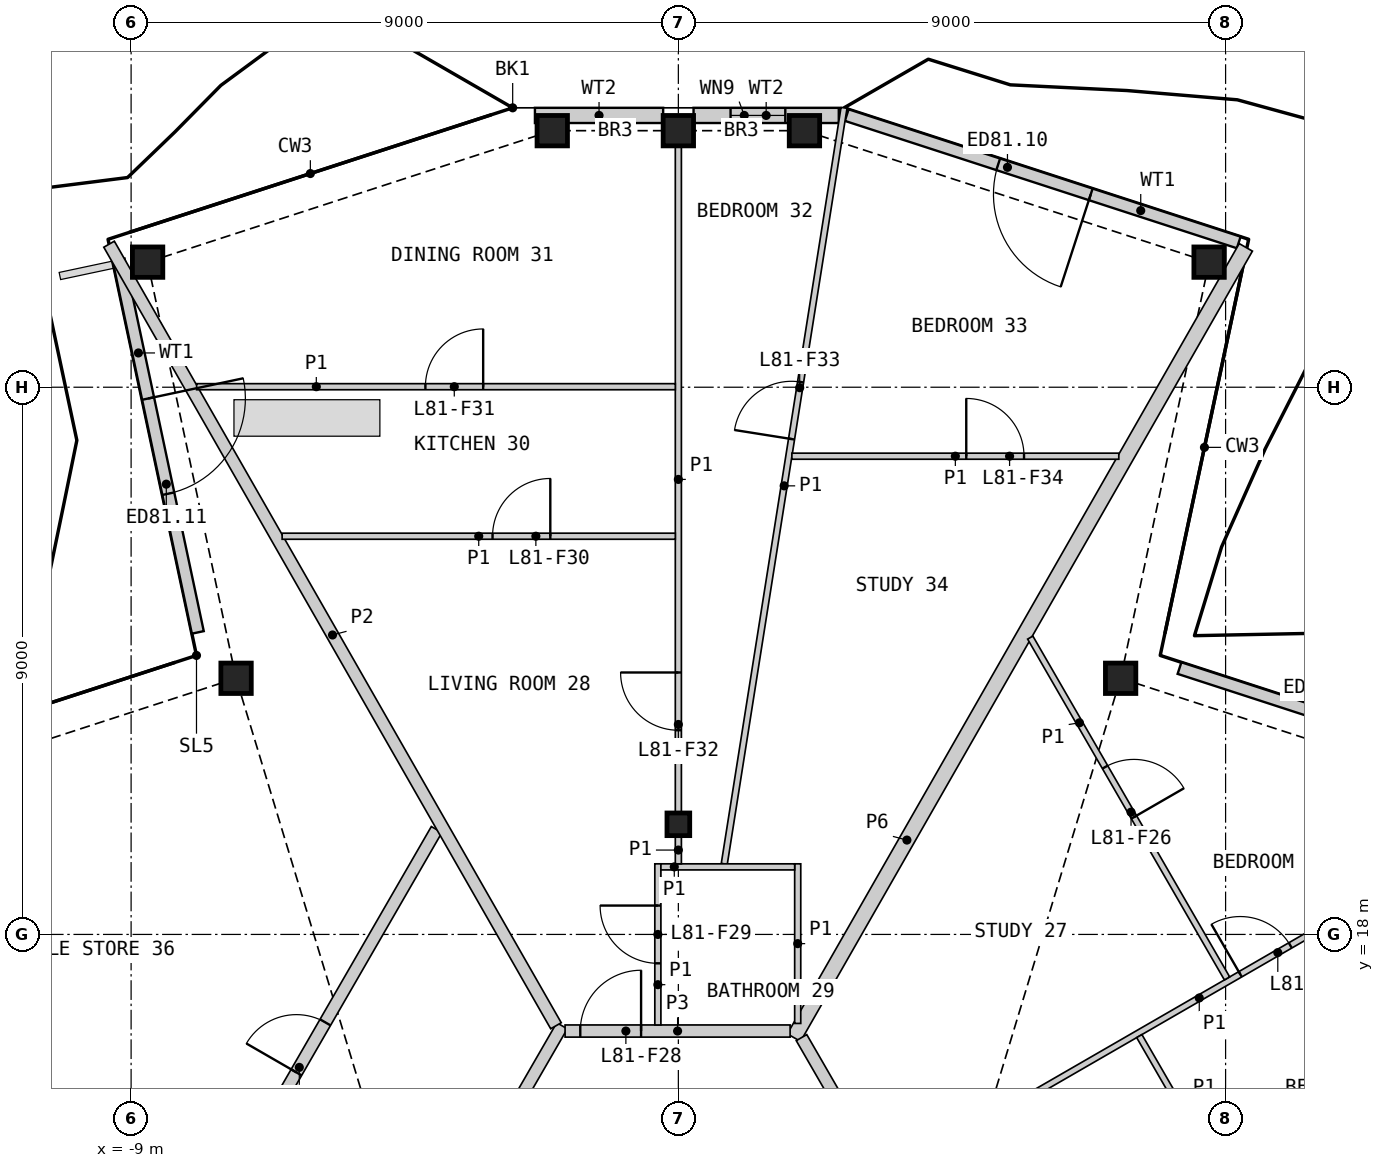
"""IFC4 building model, lengths in metres.
Left out: names, types, materials, properties, quantities, classifications, styles, units other than length and angle.
Written with IfcOpenShell. Run it as: python <this file> out.ifc"""

import sys

from ifc_helpers import new_model, si_unit, direction, frame, frame_2d, origin, origin_2d, place, context, subcontext, project, spatial, rectangle, hollow_rectangle, i_section, extrude, element, fill, save


model = new_model("IFC4")
c1 = context("Model", 3, precision=1e-05, world=origin(), true_north=direction((0.0, 1.0)))
c2 = subcontext(c1, "Body", "Model", "MODEL_VIEW")
j1 = project(units=[si_unit("LENGTHUNIT", "METRE"), si_unit("PLANEANGLEUNIT", "RADIAN")], contexts=[c1])
p1 = place(None, origin())
s1 = spatial("IfcSite", under=j1, at=p1, CompositionType="ELEMENT")
p2 = place(p1, origin())
s2 = spatial("IfcBuilding", under=s1, at=p2, CompositionType="ELEMENT")
p3 = place(p2, frame((0.0, 0.0, 364.4)))
s3 = spatial("IfcBuildingStorey", under=s2, at=p3, CompositionType="ELEMENT", Elevation=364.4)
for number, where, z_axis, x_axis in (
    (1, (7.274, 22.213, 0.0), (0.0, 0.0, 1.0), (1.0, 0.0, 0.0)),
    (2, (8.729, 29.057, 0.0), (0.0, 0.0, 1.0), (1.0, 0.0, 0.0)),
    (3, (2.074, 31.219, 0.0), (0.0, 0.0, 1.0), (1.0, 0.0, 0.0)),
    (4, (0.0, 31.219, 0.0), (0.0, 0.0, 1.0), (1.0, 0.0, 0.0)),
    (5, (-2.074, 31.219, 0.0), (0.0, 0.0, 1.0), (1.0, 0.0, 0.0)),
    (6, (-8.729, 29.057, 0.0), (0.0, 0.0, 1.0), (1.0, 0.0, 0.0)),
    (7, (-7.274, 22.213, 0.0), (0.0, 0.0, 1.0), (1.0, 0.0, 0.0)),
):
    element("IfcColumn", number, at=place(p3, frame(where, z_axis=z_axis, x_axis=x_axis)), inside=s3, PredefinedType="COLUMN", context=c2, shape_type="SweptSolid", body=[
        extrude(hollow_rectangle(XDim=0.5, YDim=0.5, WallThickness=0.03, at=origin_2d()), origin(), (0.0, 0.0, 1.0), 3.4),
    ])
p4 = place(p3, frame((0.0, 19.811, 0.0), z_axis=(0.0, 0.0, 1.0), x_axis=(1.0, 0.0, 0.0)))
e8 = element("IfcColumn", 8, at=p4, inside=s3, PredefinedType="COLUMN", context=c2, shape_type="SweptSolid", body=[
    extrude(i_section(OverallWidth=0.374, OverallDepth=0.372, WebThickness=0.016, FlangeThickness=0.026, at=origin_2d()), origin(), (0.0, 0.0, 1.0), 3.4),
])
p5 = place(p3, frame((14.331, 20.402, 0.0), z_axis=(0.0, 0.0, 1.0), x_axis=(-0.951058447414, 0.30901105094, 0.0)))
e9 = element("IfcWall", 9, at=p5, inside=s3, PredefinedType="SOLIDWALL", context=c2, shape_type="SweptSolid", body=[
    extrude(rectangle(XDim=6.402, YDim=0.2, at=frame_2d((3.201, 0.0))), origin(), (0.0, 0.0, 1.0), 2.634),
])
p6 = place(p5, frame((2.469, 0.0, 0.0)))
e10 = element("IfcOpeningElement", 10, at=p6, cuts=e9, PredefinedType="OPENING", context=c2, shape_type="SweptSolid", body=[
    extrude(rectangle(XDim=1.6, YDim=2.25, at=frame_2d((0.8, 1.125))), frame((0.0, 0.11, 0.0), z_axis=(0.0, -1.0, 0.0), x_axis=(1.0, 0.0, 0.0)), (0.0, 0.0, 1.0), 0.22),
])
p7 = place(p3, frame((9.216, 29.381, 0.0), z_axis=(0.0, 0.0, 1.0), x_axis=(-0.951058150748, 0.309011964002, 0.0)))
e11 = element("IfcWall", 11, at=p7, inside=s3, PredefinedType="SOLIDWALL", context=c2, shape_type="SweptSolid", body=[
    extrude(rectangle(XDim=6.779, YDim=0.2, at=frame_2d((3.389, 0.0))), origin(), (0.0, 0.0, 1.0), 2.634),
])
p8 = place(p7, frame((2.559, 0.0, 0.0)))
e12 = element("IfcOpeningElement", 12, at=p8, cuts=e11, PredefinedType="OPENING", context=c2, shape_type="SweptSolid", body=[
    extrude(rectangle(XDim=1.6, YDim=2.25, at=frame_2d((0.8, 1.125))), frame((0.0, 0.11, 0.0), z_axis=(0.0, -1.0, 0.0), x_axis=(1.0, 0.0, 0.0)), (0.0, 0.0, 1.0), 0.22),
])
p9 = place(p3, frame((2.638, 31.47, 0.0), z_axis=(0.0, 0.0, 1.0), x_axis=(-1.0, 0.0, 0.0)))
e13 = element("IfcWall", 13, at=p9, inside=s3, PredefinedType="SOLIDWALL", context=c2, shape_type="SweptSolid", body=[
    extrude(rectangle(XDim=2.388, YDim=0.25, at=frame_2d((1.194, 0.0))), origin(), (0.0, 0.0, 1.0), 2.634),
])
p10 = place(p9, frame((0.88, 0.0, 0.6)))
e14 = element("IfcOpeningElement", 14, at=p10, cuts=e13, PredefinedType="OPENING", context=c2, shape_type="SweptSolid", body=[
    extrude(rectangle(XDim=0.9, YDim=1.8, at=frame_2d((0.45, 0.9))), frame((0.0, 0.135, 0.0), z_axis=(0.0, -1.0, 0.0), x_axis=(1.0, 0.0, 0.0)), (0.0, 0.0, 1.0), 0.27),
])
p11 = place(p3, frame((-0.25, 31.47, 0.0), z_axis=(0.0, 0.0, 1.0), x_axis=(-1.0, 0.0, 0.0)))
e15 = element("IfcWall", 15, at=p11, inside=s3, PredefinedType="SOLIDWALL", context=c2, shape_type="SweptSolid", body=[
    extrude(rectangle(XDim=2.109, YDim=0.25, at=frame_2d((1.054, 0.0))), origin(), (0.0, 0.0, 1.0), 2.634),
])
p12 = place(p3, frame((-9.206, 29.096, 0.0), z_axis=(0.0, 0.0, 1.0), x_axis=(0.207889514624, -0.978152314167, 0.0)))
e16 = element("IfcWall", 16, at=p12, inside=s3, PredefinedType="SOLIDWALL", context=c2, shape_type="SweptSolid", body=[
    extrude(rectangle(XDim=6.265, YDim=0.2, at=frame_2d((3.133, 0.0))), origin(), (0.0, 0.0, 1.0), 2.634),
])
p13 = place(p12, frame((2.333, 0.0, 0.0)))
e17 = element("IfcOpeningElement", 17, at=p13, cuts=e16, PredefinedType="OPENING", context=c2, shape_type="SweptSolid", body=[
    extrude(rectangle(XDim=1.6, YDim=2.25, at=frame_2d((0.8, 1.125))), frame((0.0, 0.11, 0.0), z_axis=(0.0, -1.0, 0.0), x_axis=(1.0, 0.0, 0.0)), (0.0, 0.0, 1.0), 0.22),
])
p14 = place(p3, frame((1.901, 16.302, 0.0), z_axis=(0.0, 0.0, 1.0), x_axis=(0.496368960053, 0.86811166073, 0.0)))
e18 = element("IfcWall", 18, at=p14, inside=s3, PredefinedType="PARTITIONING", context=c2, shape_type="SweptSolid", body=[
    extrude(rectangle(XDim=14.972, YDim=0.25, at=frame_2d((7.486, 0.0))), origin(), (0.0, 0.0, 1.0), 2.33),
])
p15 = place(p3, frame((2.025, 16.303, 0.0), z_axis=(0.0, 0.0, 1.0), x_axis=(0.500004215162, -0.866022970146, 0.0)))
e19 = element("IfcWall", 19, at=p15, inside=s3, PredefinedType="PARTITIONING", context=c2, shape_type="SweptSolid", body=[
    extrude(rectangle(XDim=4.3, YDim=0.2, at=frame_2d((2.15, 0.0))), origin(), (0.0, 0.0, 1.0), 3.1),
])
p16 = place(p3, frame((-4.176, 12.579, 0.0), z_axis=(0.0, 0.0, 1.0), x_axis=(0.499974648164, 0.866040040179, 0.0)))
e20 = element("IfcWall", 20, at=p16, inside=s3, PredefinedType="PARTITIONING", context=c2, shape_type="SweptSolid", body=[
    extrude(rectangle(XDim=4.525, YDim=0.2, at=frame_2d((2.263, 0.0))), origin(), (0.0, 0.0, 1.0), 3.1),
])
p17 = place(p3, frame((-1.863, 16.411, 0.0), z_axis=(0.0, 0.0, 1.0), x_axis=(1.0, 0.0, 0.0)))
e21 = element("IfcWall", 21, at=p17, inside=s3, PredefinedType="PARTITIONING", context=c2, shape_type="SweptSolid", body=[
    extrude(rectangle(XDim=3.701, YDim=0.2, at=frame_2d((1.851, 0.0))), origin(), (0.0, 0.0, 1.0), 3.1),
])
p18 = place(p17, frame((0.25, 0.0, 0.0)))
e22 = element("IfcOpeningElement", 22, at=p18, cuts=e21, PredefinedType="OPENING", context=c2, shape_type="SweptSolid", body=[
    extrude(rectangle(XDim=1.0, YDim=2.1, at=frame_2d((0.5, 1.05))), frame((0.0, 0.11, 0.0), z_axis=(0.0, -1.0, 0.0), x_axis=(1.0, 0.0, 0.0)), (0.0, 0.0, 1.0), 0.22),
])
p19 = place(p3, frame((-11.473, 6.74, 0.0), z_axis=(0.0, 0.0, 1.0), x_axis=(0.499993542657, 0.866029131901, 0.0)))
e23 = element("IfcWall", 23, at=p19, inside=s3, PredefinedType="PARTITIONING", context=c2, shape_type="SweptSolid", body=[
    extrude(rectangle(XDim=14.994, YDim=0.2, at=frame_2d((7.497, 0.0))), origin(), (0.0, 0.0, 1.0), 2.33),
])
p20 = place(p19, frame((10.383, 0.0, 0.0)))
e24 = element("IfcOpeningElement", 24, at=p20, cuts=e23, PredefinedType="OPENING", context=c2, shape_type="SweptSolid", body=[
    extrude(rectangle(XDim=0.95, YDim=2.1, at=frame_2d((0.475, 1.05))), frame((0.0, 0.11, 0.0), z_axis=(0.0, -1.0, 0.0), x_axis=(1.0, 0.0, 0.0)), (0.0, 0.0, 1.0), 0.22),
])
p21 = place(p3, frame((-9.362, 29.352, 0.0), z_axis=(0.0, 0.0, 1.0), x_axis=(0.496351997927, -0.868121359116, 0.0)))
e25 = element("IfcWall", 25, at=p21, inside=s3, PredefinedType="PARTITIONING", context=c2, shape_type="SweptSolid", body=[
    extrude(rectangle(XDim=14.807, YDim=0.2, at=frame_2d((7.404, 0.0))), origin(), (0.0, 0.0, 1.0), 2.33),
])
p22 = place(p3, frame((0.755, 19.16, 0.0), z_axis=(0.0, 0.0, 1.0), x_axis=(0.15643456532, 0.987688324712, 0.0)))
e26 = element("IfcWall", 26, at=p22, inside=s3, PredefinedType="PARTITIONING", context=c2, shape_type="SweptSolid", body=[
    extrude(rectangle(XDim=12.59, YDim=0.1, at=frame_2d((6.295, 0.0))), origin(), (0.0, 0.0, 1.0), 2.33),
])
p23 = place(p22, frame((7.074, 0.0, 0.0)))
e27 = element("IfcOpeningElement", 27, at=p23, cuts=e26, PredefinedType="OPENING", context=c2, shape_type="SweptSolid", body=[
    extrude(rectangle(XDim=0.95, YDim=2.1, at=frame_2d((0.475, 1.05))), frame((0.0, 0.06, 0.0), z_axis=(0.0, -1.0, 0.0), x_axis=(1.0, 0.0, 0.0)), (0.0, 0.0, 1.0), 0.12),
])
p24 = place(p3, frame((3.465, 14.01, 0.0), z_axis=(0.0, 0.0, 1.0), x_axis=(0.866032376801, 0.499987922186, 0.0)))
e28 = element("IfcWall", 28, at=p24, inside=s3, PredefinedType="PARTITIONING", context=c2, shape_type="SweptSolid", body=[
    extrude(rectangle(XDim=11.782, YDim=0.1, at=frame_2d((5.891, 0.0))), origin(), (0.0, 0.0, 1.0), 2.33),
])
p25 = place(p24, frame((6.67, 0.0, 0.0)))
e29 = element("IfcOpeningElement", 29, at=p25, cuts=e28, PredefinedType="OPENING", context=c2, shape_type="SweptSolid", body=[
    extrude(rectangle(XDim=0.95, YDim=2.1, at=frame_2d((0.475, 1.05))), frame((0.0, 0.06, 0.0), z_axis=(0.0, -1.0, 0.0), x_axis=(1.0, 0.0, 0.0)), (0.0, 0.0, 1.0), 0.12),
])
p26 = place(p3, frame((0.0, 20.008, 0.0), z_axis=(0.0, 0.0, 1.0), x_axis=(0.0, 1.0, 0.0)))
e30 = element("IfcWall", 30, at=p26, inside=s3, PredefinedType="PARTITIONING", context=c2, shape_type="SweptSolid", body=[
    extrude(rectangle(XDim=10.951, YDim=0.1, at=frame_2d((5.476, 0.0))), origin(), (0.0, 0.0, 1.0), 2.33),
])
p27 = place(p26, frame((1.35, 0.0, 0.0)))
e31 = element("IfcOpeningElement", 31, at=p27, cuts=e30, PredefinedType="OPENING", context=c2, shape_type="SweptSolid", body=[
    extrude(rectangle(XDim=0.95, YDim=2.1, at=frame_2d((0.475, 1.05))), frame((0.0, 0.06, 0.0), z_axis=(0.0, -1.0, 0.0), x_axis=(1.0, 0.0, 0.0)), (0.0, 0.0, 1.0), 0.12),
])
p28 = place(p3, frame((-7.922, 27.009, 0.0), z_axis=(0.0, 0.0, 1.0), x_axis=(1.0, 0.0, 0.0)))
e32 = element("IfcWall", 32, at=p28, inside=s3, PredefinedType="PARTITIONING", context=c2, shape_type="SweptSolid", body=[
    extrude(rectangle(XDim=7.872, YDim=0.1, at=frame_2d((3.936, 0.0))), origin(), (0.0, 0.0, 1.0), 2.33),
])
p29 = place(p28, frame((3.762, 0.0, 0.0)))
e33 = element("IfcOpeningElement", 33, at=p29, cuts=e32, PredefinedType="OPENING", context=c2, shape_type="SweptSolid", body=[
    extrude(rectangle(XDim=0.95, YDim=2.1, at=frame_2d((0.475, 1.05))), frame((0.0, 0.06, 0.0), z_axis=(0.0, -1.0, 0.0), x_axis=(1.0, 0.0, 0.0)), (0.0, 0.0, 1.0), 0.12),
])
p30 = place(p3, frame((5.787, 22.882, 0.0), z_axis=(0.0, 0.0, 1.0), x_axis=(0.500001069878, -0.866024786089, 0.0)))
e34 = element("IfcWall", 34, at=p30, inside=s3, PredefinedType="PARTITIONING", context=c2, shape_type="SweptSolid", body=[
    extrude(rectangle(XDim=6.473, YDim=0.1, at=frame_2d((3.236, 0.0))), origin(), (0.0, 0.0, 1.0), 2.33),
])
p31 = place(p30, frame((2.46, 0.0, 0.0)))
e35 = element("IfcOpeningElement", 35, at=p31, cuts=e34, PredefinedType="OPENING", context=c2, shape_type="SweptSolid", body=[
    extrude(rectangle(XDim=0.95, YDim=2.1, at=frame_2d((0.475, 1.05))), frame((0.0, 0.06, 0.0), z_axis=(0.0, -1.0, 0.0), x_axis=(1.0, 0.0, 0.0)), (0.0, 0.0, 1.0), 0.12),
])
p32 = place(p3, frame((-6.516, 24.549, 0.0), z_axis=(0.0, 0.0, 1.0), x_axis=(1.0, 0.0, 0.0)))
e36 = element("IfcWall", 36, at=p32, inside=s3, PredefinedType="PARTITIONING", context=c2, shape_type="SweptSolid", body=[
    extrude(rectangle(XDim=6.466, YDim=0.1, at=frame_2d((3.233, 0.0))), origin(), (0.0, 0.0, 1.0), 2.33),
])
p33 = place(p32, frame((3.46, 0.0, 0.0)))
e37 = element("IfcOpeningElement", 37, at=p33, cuts=e36, PredefinedType="OPENING", context=c2, shape_type="SweptSolid", body=[
    extrude(rectangle(XDim=0.95, YDim=2.1, at=frame_2d((0.475, 1.05))), frame((0.0, 0.06, 0.0), z_axis=(0.0, -1.0, 0.0), x_axis=(1.0, 0.0, 0.0)), (0.0, 0.0, 1.0), 0.12),
])
p34 = place(p3, frame((1.867, 25.865, 0.0), z_axis=(0.0, 0.0, 1.0), x_axis=(1.0, 0.0, 0.0)))
e38 = element("IfcWall", 38, at=p34, inside=s3, PredefinedType="PARTITIONING", context=c2, shape_type="SweptSolid", body=[
    extrude(rectangle(XDim=5.376, YDim=0.1, at=frame_2d((2.688, 0.0))), origin(), (0.0, 0.0, 1.0), 2.33),
])
p35 = place(p34, frame((2.868, 0.0, 0.0)))
e39 = element("IfcOpeningElement", 39, at=p35, cuts=e38, PredefinedType="OPENING", context=c2, shape_type="SweptSolid", body=[
    extrude(rectangle(XDim=0.95, YDim=2.1, at=frame_2d((0.475, 1.05))), frame((0.0, 0.06, 0.0), z_axis=(0.0, -1.0, 0.0), x_axis=(1.0, 0.0, 0.0)), (0.0, 0.0, 1.0), 0.12),
])
p36 = place(p3, frame((7.581, 16.328, 0.0), z_axis=(0.0, 0.0, 1.0), x_axis=(0.500005610874, -0.86602216432, 0.0)))
e40 = element("IfcWall", 40, at=p36, inside=s3, PredefinedType="PARTITIONING", context=c2, shape_type="SweptSolid", body=[
    extrude(rectangle(XDim=5.1, YDim=0.1, at=frame_2d((2.55, 0.0))), origin(), (0.0, 0.0, 1.0), 2.33),
])
p37 = place(p36, frame((2.379, 0.0, 0.0)))
e41 = element("IfcOpeningElement", 41, at=p37, cuts=e40, PredefinedType="OPENING", context=c2, shape_type="SweptSolid", body=[
    extrude(rectangle(XDim=0.95, YDim=2.1, at=frame_2d((0.475, 1.05))), frame((0.0, 0.06, 0.0), z_axis=(0.0, -1.0, 0.0), x_axis=(1.0, 0.0, 0.0)), (0.0, 0.0, 1.0), 0.12),
])
p38 = place(p3, frame((-0.337, 16.511, 0.0), z_axis=(0.0, 0.0, 1.0), x_axis=(0.0, 1.0, 0.0)))
e42 = element("IfcWall", 42, at=p38, inside=s3, PredefinedType="PARTITIONING", context=c2, shape_type="SweptSolid", body=[
    extrude(rectangle(XDim=2.65, YDim=0.1, at=frame_2d((1.325, 0.0))), origin(), (0.0, 0.0, 1.0), 2.33),
])
p39 = place(p38, frame((1.014, 0.0, 0.0)))
e43 = element("IfcOpeningElement", 43, at=p39, cuts=e42, PredefinedType="OPENING", context=c2, shape_type="SweptSolid", body=[
    extrude(rectangle(XDim=0.95, YDim=2.1, at=frame_2d((0.475, 1.05))), frame((0.0, 0.06, 0.0), z_axis=(0.0, -1.0, 0.0), x_axis=(1.0, 0.0, 0.0)), (0.0, 0.0, 1.0), 0.12),
])
p40 = place(p3, frame((1.963, 16.536, 0.0), z_axis=(0.0, 0.0, 1.0), x_axis=(0.0, 1.0, 0.0)))
e44 = element("IfcWall", 44, at=p40, inside=s3, PredefinedType="PARTITIONING", context=c2, shape_type="SweptSolid", body=[
    extrude(rectangle(XDim=2.625, YDim=0.1, at=frame_2d((1.312, 0.0))), origin(), (0.0, 0.0, 1.0), 2.33),
])
p41 = place(p3, frame((-0.287, 19.111, 0.0), z_axis=(0.0, 0.0, 1.0), x_axis=(1.0, 0.0, 0.0)))
e45 = element("IfcWall", 45, at=p41, inside=s3, PredefinedType="PARTITIONING", context=c2, shape_type="SweptSolid", body=[
    extrude(rectangle(XDim=2.2, YDim=0.1, at=frame_2d((1.1, 0.0))), origin(), (0.0, 0.0, 1.0), 2.33),
])
p42 = place(p3, frame((0.0, 19.161, 0.0), z_axis=(0.0, 0.0, 1.0), x_axis=(0.0, 1.0, 0.0)))
e46 = element("IfcWall", 46, at=p42, inside=s3, PredefinedType="PARTITIONING", context=c2, shape_type="SweptSolid", body=[
    extrude(rectangle(XDim=0.453, YDim=0.1, at=frame_2d((0.227, 0.0))), origin(), (0.0, 0.0, 1.0), 2.33),
])
p43 = place(p8, origin())
e47 = element("IfcDoor", 47, at=p43, inside=s3, OperationType="DOUBLE_DOOR_SINGLE_SWING", PredefinedType="DOOR", context=c2, shape_type="SweptSolid", body=[
    extrude(rectangle(XDim=1.6, YDim=2.25, at=frame_2d((0.8, 1.125))), frame((0.0, 0.025, 0.0), z_axis=(0.0, -1.0, 0.0), x_axis=(1.0, 0.0, 0.0)), (0.0, 0.0, 1.0), 0.05),
])
fill(e12, e47)
p44 = place(p10, origin())
e48 = element("IfcWindow", 48, at=p44, inside=s3, PartitioningType="SINGLE_PANEL", PredefinedType="WINDOW", context=c2, shape_type="SweptSolid", body=[
    extrude(rectangle(XDim=0.9, YDim=1.8, at=frame_2d((0.45, 0.9))), frame((0.0, 0.03, 0.0), z_axis=(0.0, -1.0, 0.0), x_axis=(1.0, 0.0, 0.0)), (0.0, 0.0, 1.0), 0.06),
])
fill(e14, e48)
p45 = place(p13, origin())
e49 = element("IfcDoor", 49, at=p45, inside=s3, OperationType="DOUBLE_DOOR_SINGLE_SWING", PredefinedType="DOOR", context=c2, shape_type="SweptSolid", body=[
    extrude(rectangle(XDim=1.6, YDim=2.25, at=frame_2d((0.8, 1.125))), frame((0.0, 0.025, 0.0), z_axis=(0.0, -1.0, 0.0), x_axis=(1.0, 0.0, 0.0)), (0.0, 0.0, 1.0), 0.05),
])
fill(e17, e49)
p46 = place(p25, origin())
e50 = element("IfcDoor", 50, at=p46, inside=s3, OperationType="SINGLE_SWING_LEFT", PredefinedType="DOOR", context=c2, shape_type="SweptSolid", body=[
    extrude(rectangle(XDim=0.95, YDim=2.1, at=frame_2d((0.475, 1.05))), frame((0.0, 0.025, 0.0), z_axis=(0.0, -1.0, 0.0), x_axis=(1.0, 0.0, 0.0)), (0.0, 0.0, 1.0), 0.05),
])
fill(e29, e50)
p47 = place(p31, origin())
e51 = element("IfcDoor", 51, at=p47, inside=s3, OperationType="SINGLE_SWING_RIGHT", PredefinedType="DOOR", context=c2, shape_type="SweptSolid", body=[
    extrude(rectangle(XDim=0.95, YDim=2.1, at=frame_2d((0.475, 1.05))), frame((0.0, 0.025, 0.0), z_axis=(0.0, -1.0, 0.0), x_axis=(1.0, 0.0, 0.0)), (0.0, 0.0, 1.0), 0.05),
])
fill(e35, e51)
p48 = place(p18, origin())
e52 = element("IfcDoor", 52, at=p48, inside=s3, OperationType="SINGLE_SWING_RIGHT", PredefinedType="DOOR", context=c2, shape_type="SweptSolid", body=[
    extrude(rectangle(XDim=1.0, YDim=2.1, at=frame_2d((0.5, 1.05))), frame((0.0, 0.025, 0.0), z_axis=(0.0, -1.0, 0.0), x_axis=(1.0, 0.0, 0.0)), (0.0, 0.0, 1.0), 0.05),
])
fill(e22, e52)
p49 = place(p39, origin())
e53 = element("IfcDoor", 53, at=p49, inside=s3, OperationType="SINGLE_SWING_RIGHT", PredefinedType="DOOR", context=c2, shape_type="SweptSolid", body=[
    extrude(rectangle(XDim=0.95, YDim=2.1, at=frame_2d((0.475, 1.05))), frame((0.0, 0.025, 0.0), z_axis=(0.0, -1.0, 0.0), x_axis=(1.0, 0.0, 0.0)), (0.0, 0.0, 1.0), 0.05),
])
fill(e43, e53)
p50 = place(p33, origin())
e54 = element("IfcDoor", 54, at=p50, inside=s3, OperationType="SINGLE_SWING_RIGHT", PredefinedType="DOOR", context=c2, shape_type="SweptSolid", body=[
    extrude(rectangle(XDim=0.95, YDim=2.1, at=frame_2d((0.475, 1.05))), frame((0.0, 0.025, 0.0), z_axis=(0.0, -1.0, 0.0), x_axis=(1.0, 0.0, 0.0)), (0.0, 0.0, 1.0), 0.05),
])
fill(e37, e54)
p51 = place(p29, origin())
e55 = element("IfcDoor", 55, at=p51, inside=s3, OperationType="SINGLE_SWING_RIGHT", PredefinedType="DOOR", context=c2, shape_type="SweptSolid", body=[
    extrude(rectangle(XDim=0.95, YDim=2.1, at=frame_2d((0.475, 1.05))), frame((0.0, 0.025, 0.0), z_axis=(0.0, -1.0, 0.0), x_axis=(1.0, 0.0, 0.0)), (0.0, 0.0, 1.0), 0.05),
])
fill(e33, e55)
p52 = place(p27, origin())
e56 = element("IfcDoor", 56, at=p52, inside=s3, OperationType="SINGLE_SWING_RIGHT", PredefinedType="DOOR", context=c2, shape_type="SweptSolid", body=[
    extrude(rectangle(XDim=0.95, YDim=2.1, at=frame_2d((0.475, 1.05))), frame((0.0, 0.025, 0.0), z_axis=(0.0, -1.0, 0.0), x_axis=(1.0, 0.0, 0.0)), (0.0, 0.0, 1.0), 0.05),
])
fill(e31, e56)
p53 = place(p23, origin())
e57 = element("IfcDoor", 57, at=p53, inside=s3, OperationType="SINGLE_SWING_LEFT", PredefinedType="DOOR", context=c2, shape_type="SweptSolid", body=[
    extrude(rectangle(XDim=0.95, YDim=2.1, at=frame_2d((0.475, 1.05))), frame((0.0, 0.025, 0.0), z_axis=(0.0, -1.0, 0.0), x_axis=(1.0, 0.0, 0.0)), (0.0, 0.0, 1.0), 0.05),
])
fill(e27, e57)
p54 = place(p35, origin())
e58 = element("IfcDoor", 58, at=p54, inside=s3, OperationType="SINGLE_SWING_LEFT", PredefinedType="DOOR", context=c2, shape_type="SweptSolid", body=[
    extrude(rectangle(XDim=0.95, YDim=2.1, at=frame_2d((0.475, 1.05))), frame((0.0, 0.025, 0.0), z_axis=(0.0, -1.0, 0.0), x_axis=(1.0, 0.0, 0.0)), (0.0, 0.0, 1.0), 0.05),
])
fill(e39, e58)
p55 = place(p20, origin())
e59 = element("IfcDoor", 59, at=p55, inside=s3, OperationType="SINGLE_SWING_LEFT", PredefinedType="DOOR", context=c2, shape_type="SweptSolid", body=[
    extrude(rectangle(XDim=0.95, YDim=2.1, at=frame_2d((0.475, 1.05))), frame((0.0, 0.025, 0.0), z_axis=(0.0, -1.0, 0.0), x_axis=(1.0, 0.0, 0.0)), (0.0, 0.0, 1.0), 0.05),
])
fill(e24, e59)
save(model, sys.argv[1])
